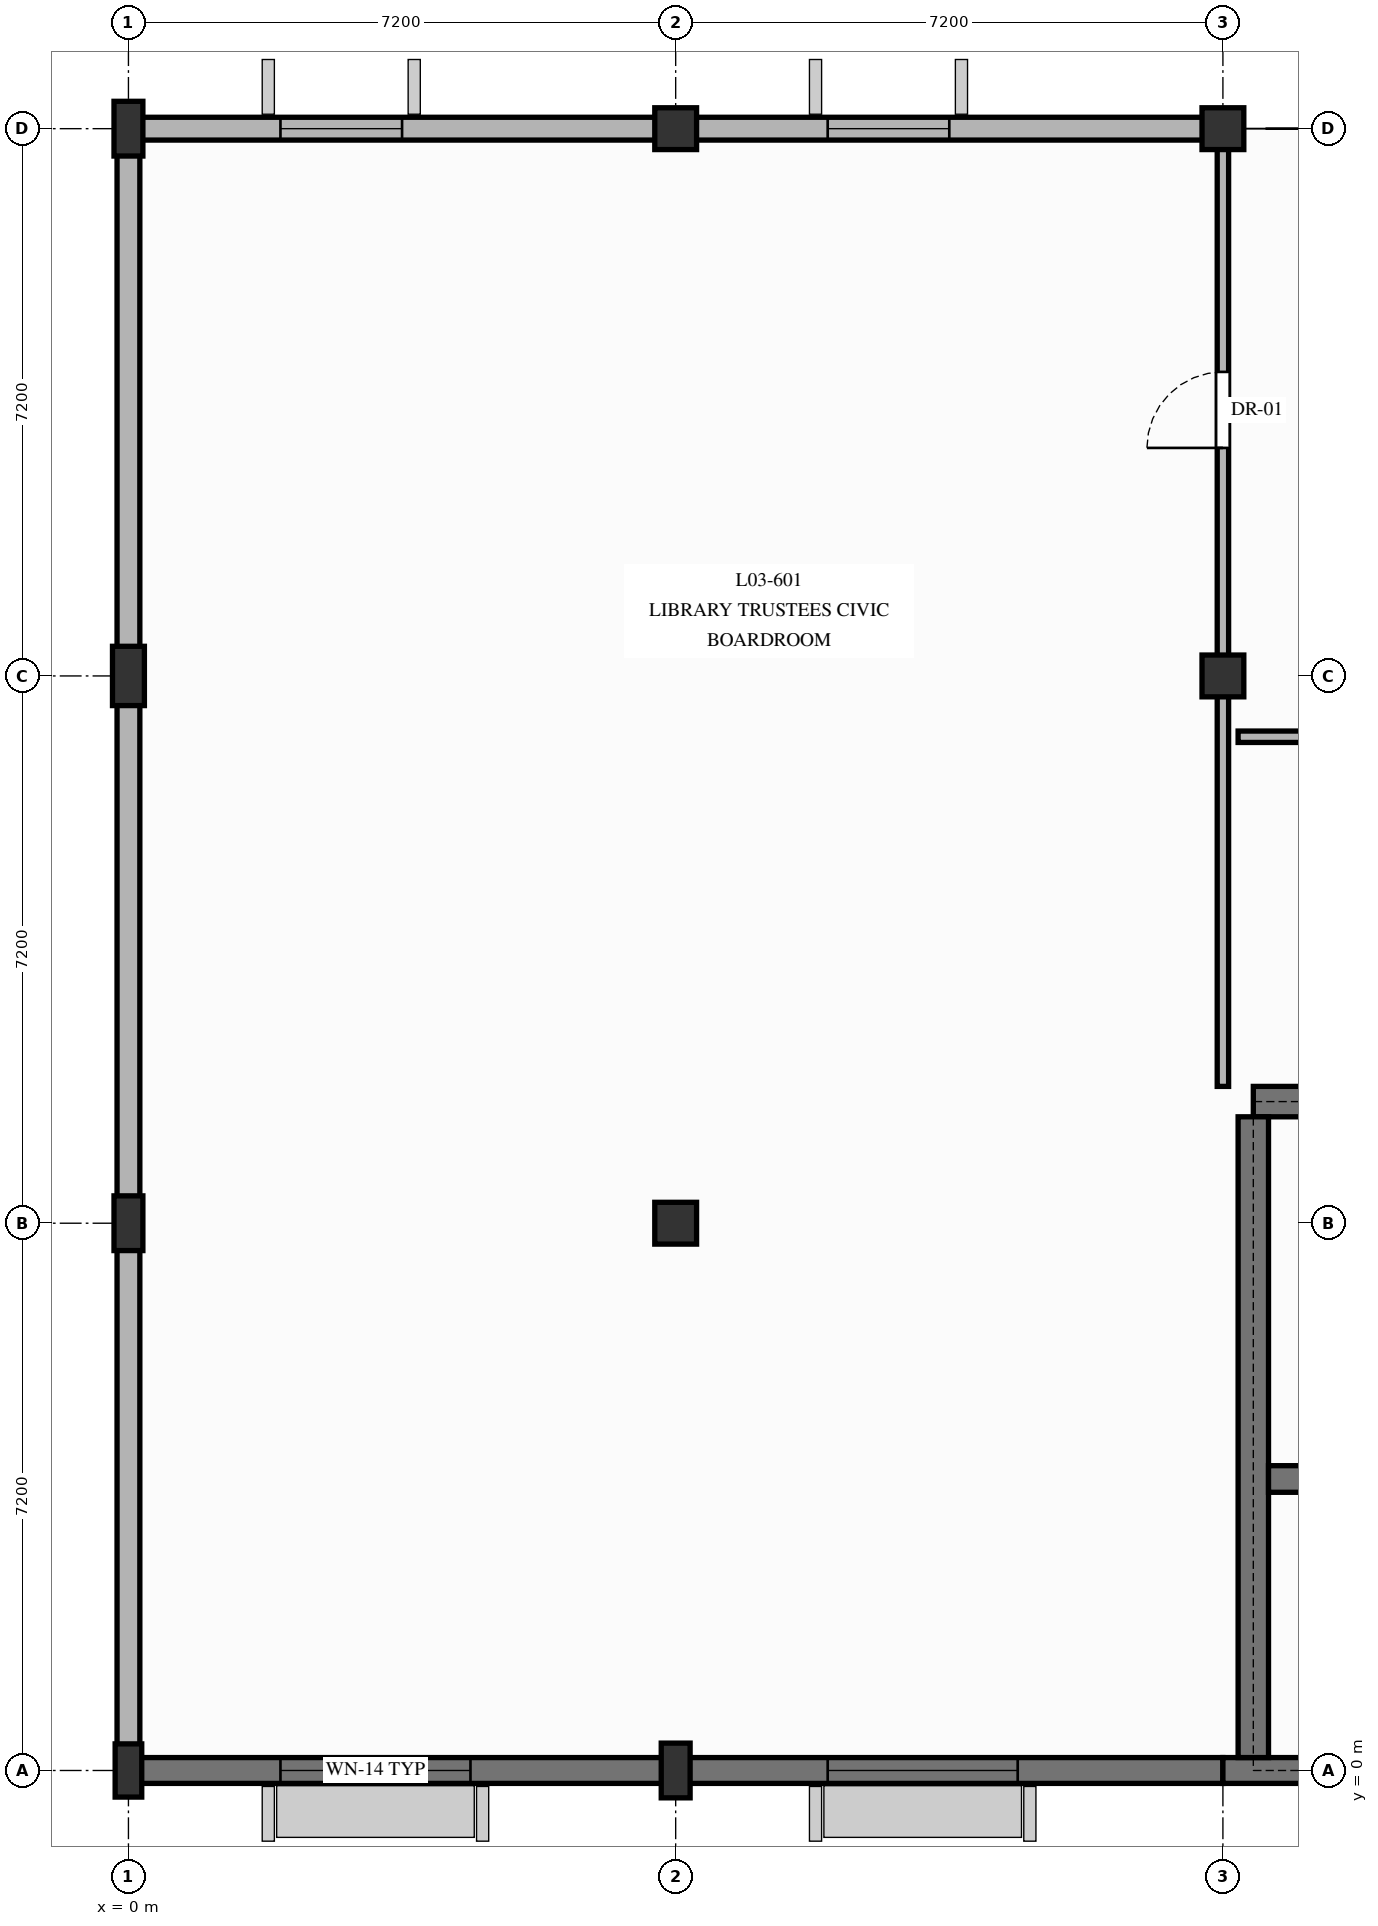
"""IFC4 building model, lengths in metres.
Left out: names, types, materials, properties, quantities, classifications, styles, units other than length and angle.
Written with IfcOpenShell. Run it as: python <this file> out.ifc"""

import sys

from ifc_helpers import new_model, si_unit, direction, frame, frame_2d, origin, origin_with_axes, origin_2d, place, context, subcontext, project, spatial, rectangle, extrude, element, fill, save


model = new_model("IFC4")
c1 = context("Model", 3, precision=1e-05, world=origin(), true_north=direction((0.0, 1.0)))
c2 = subcontext(c1, "Body", "Model", "MODEL_VIEW")
j1 = project(units=[si_unit("LENGTHUNIT", "METRE"), si_unit("PLANEANGLEUNIT", "RADIAN")], contexts=[c1])
p1 = place(None, origin())
s1 = spatial("IfcSite", under=j1, at=p1, CompositionType="ELEMENT")
p2 = place(p1, origin())
s2 = spatial("IfcBuilding", under=s1, at=p2, CompositionType="ELEMENT")
p3 = place(p2, frame((0.0, 0.0, 12.78)))
s3 = spatial("IfcBuildingStorey", under=s2, at=p3, CompositionType="ELEMENT", Elevation=12.78)
p4 = place(p3, frame((0.0, 0.0, 0.0), z_axis=(0.0, 0.0, 1.0), x_axis=(0.0, 1.0, 0.0)))
e1 = element("IfcColumn", 1, at=p4, inside=s3, PredefinedType="PILASTER", context=c2, shape_type="SweptSolid", body=[
    extrude(rectangle(XDim=0.35, YDim=0.7, at=origin_2d()), origin(), (0.0, 0.0, 1.0), 3.74),
])
p5 = place(p3, frame((0.0, 7.2, 0.0), z_axis=(0.0, 0.0, 1.0), x_axis=(1.0, 0.0, 0.0)))
e2 = element("IfcColumn", 2, at=p5, inside=s3, PredefinedType="PILASTER", context=c2, shape_type="SweptSolid", body=[
    extrude(rectangle(XDim=0.38, YDim=0.72, at=origin_2d()), origin(), (0.0, 0.0, 1.0), 3.74),
])
p6 = place(p3, frame((0.0, 14.4, 0.0), z_axis=(0.0, 0.0, 1.0), x_axis=(1.0, 0.0, 0.0)))
e3 = element("IfcColumn", 3, at=p6, inside=s3, PredefinedType="PILASTER", context=c2, shape_type="SweptSolid", body=[
    extrude(rectangle(XDim=0.42, YDim=0.78, at=origin_2d()), origin(), (0.0, 0.0, 1.0), 3.74),
])
for number, where, z_axis, x_axis in (
    (4, (0.0, 21.6, 0.0), (0.0, 0.0, 1.0), (1.0, 0.0, 0.0)),
    (5, (7.2, 0.0, 0.0), (0.0, 0.0, 1.0), (0.0, 1.0, 0.0)),
):
    element("IfcColumn", number, at=place(p3, frame(where, z_axis=z_axis, x_axis=x_axis)), inside=s3, PredefinedType="PILASTER", context=c2, shape_type="SweptSolid", body=[
        extrude(rectangle(XDim=0.38, YDim=0.72, at=origin_2d()), origin(), (0.0, 0.0, 1.0), 3.74),
    ])
for number, where, z_axis, x_axis in (
    (6, (7.2, 7.2, 0.0), (0.0, 0.0, 1.0), (1.0, 0.0, 0.0)),
    (7, (7.2, 21.6, 0.0), (0.0, 0.0, 1.0), (1.0, 0.0, 0.0)),
    (8, (14.4, 14.4, 0.0), (0.0, 0.0, 1.0), (1.0, 0.0, 0.0)),
    (9, (14.4, 21.6, 0.0), (0.0, 0.0, 1.0), (1.0, 0.0, 0.0)),
):
    element("IfcColumn", number, at=place(p3, frame(where, z_axis=z_axis, x_axis=x_axis)), inside=s3, PredefinedType="COLUMN", context=c2, shape_type="SweptSolid", body=[
        extrude(rectangle(XDim=0.55, YDim=0.55, at=origin_2d()), origin(), (0.0, 0.0, 1.0), 3.74),
    ])
p7 = place(p3, origin_with_axes())
e10 = element("IfcWall", 10, at=p7, inside=s3, PredefinedType="SOLIDWALL", context=c2, shape_type="SweptSolid", body=[
    extrude(rectangle(XDim=7.2, YDim=0.34, at=frame_2d((3.6, 0.0))), origin(), (0.0, 0.0, 1.0), 3.42),
])
p8 = place(p7, frame((2.0, 0.0, 0.765)))
e11 = element("IfcOpeningElement", 11, at=p8, cuts=e10, PredefinedType="OPENING", context=c2, shape_type="SweptSolid", body=[
    extrude(rectangle(XDim=2.5, YDim=2.0, at=frame_2d((1.25, 1.0))), frame((0.0, 0.18, 0.0), z_axis=(0.0, -1.0, 0.0), x_axis=(1.0, 0.0, 0.0)), (0.0, 0.0, 1.0), 0.36),
])
p9 = place(p3, frame((7.2, 0.0, 0.0), z_axis=(0.0, 0.0, 1.0), x_axis=(1.0, 0.0, 0.0)))
e12 = element("IfcWall", 12, at=p9, inside=s3, PredefinedType="SOLIDWALL", context=c2, shape_type="SweptSolid", body=[
    extrude(rectangle(XDim=7.2, YDim=0.34, at=frame_2d((3.6, 0.0))), origin(), (0.0, 0.0, 1.0), 3.42),
])
p10 = place(p9, frame((2.0, 0.0, 0.85)))
e13 = element("IfcOpeningElement", 13, at=p10, cuts=e12, PredefinedType="OPENING", context=c2, shape_type="SweptSolid", body=[
    extrude(rectangle(XDim=2.5, YDim=2.0, at=frame_2d((1.25, 1.0))), frame((0.0, 0.18, 0.0), z_axis=(0.0, -1.0, 0.0), x_axis=(1.0, 0.0, 0.0)), (0.0, 0.0, 1.0), 0.36),
])
p11 = place(p3, frame((14.4, 0.0, 0.0), z_axis=(0.0, 0.0, 1.0), x_axis=(1.0, 0.0, 0.0)))
e14 = element("IfcWall", 14, at=p11, inside=s3, PredefinedType="SOLIDWALL", context=c2, shape_type="SweptSolid", body=[
    extrude(rectangle(XDim=7.2, YDim=0.34, at=frame_2d((3.6, 0.0))), origin(), (0.0, 0.0, 1.0), 3.42),
])
p12 = place(p11, frame((5.2, 0.0, 1.05)))
e15 = element("IfcOpeningElement", 15, at=p12, cuts=e14, PredefinedType="OPENING", context=c2, shape_type="SweptSolid", body=[
    extrude(rectangle(XDim=1.05, YDim=1.75, at=frame_2d((0.525, 0.875))), frame((0.0, 0.18, 0.0), z_axis=(0.0, -1.0, 0.0), x_axis=(1.0, 0.0, 0.0)), (0.0, 0.0, 1.0), 0.36),
])
for number, where, z_axis, x_axis in (
    (16, (0.0, 0.0, 0.0), (0.0, 0.0, 1.0), (0.0, 1.0, 0.0)),
    (17, (0.0, 7.2, 0.0), (0.0, 0.0, 1.0), (0.0, 1.0, 0.0)),
):
    element("IfcWall", number, at=place(p3, frame(where, z_axis=z_axis, x_axis=x_axis)), inside=s3, PredefinedType="SOLIDWALL", context=c2, shape_type="SweptSolid", body=[
        extrude(rectangle(XDim=7.2, YDim=0.3, at=frame_2d((3.6, 0.0))), origin(), (0.0, 0.0, 1.0), 2.805),
    ])
p13 = place(p3, frame((0.0, 14.4, 0.0), z_axis=(0.0, 0.0, 1.0), x_axis=(0.0, 1.0, 0.0)))
e18 = element("IfcWall", 18, at=p13, inside=s3, PredefinedType="SOLIDWALL", context=c2, shape_type="SweptSolid", body=[
    extrude(rectangle(XDim=7.2, YDim=0.3, at=frame_2d((3.6, 0.0))), origin(), (0.0, 0.0, 1.0), 2.805),
])
p14 = place(p3, frame((0.0, 21.6, 0.0), z_axis=(0.0, 0.0, 1.0), x_axis=(1.0, 0.0, 0.0)))
e19 = element("IfcWall", 19, at=p14, inside=s3, PredefinedType="SOLIDWALL", context=c2, shape_type="SweptSolid", body=[
    extrude(rectangle(XDim=7.2, YDim=0.3, at=frame_2d((3.6, 0.0))), origin(), (0.0, 0.0, 1.0), 2.805),
])
p15 = place(p14, frame((2.0, 0.0, 0.635)))
e20 = element("IfcOpeningElement", 20, at=p15, cuts=e19, PredefinedType="OPENING", context=c2, shape_type="SweptSolid", body=[
    extrude(rectangle(XDim=1.6, YDim=2.05, at=frame_2d((0.8, 1.025))), frame((0.0, 0.16, 0.0), z_axis=(0.0, -1.0, 0.0), x_axis=(1.0, 0.0, 0.0)), (0.0, 0.0, 1.0), 0.32),
])
p16 = place(p3, frame((7.2, 21.6, 0.0), z_axis=(0.0, 0.0, 1.0), x_axis=(1.0, 0.0, 0.0)))
e21 = element("IfcWall", 21, at=p16, inside=s3, PredefinedType="SOLIDWALL", context=c2, shape_type="SweptSolid", body=[
    extrude(rectangle(XDim=7.2, YDim=0.3, at=frame_2d((3.6, 0.0))), origin(), (0.0, 0.0, 1.0), 2.805),
])
p17 = place(p16, frame((2.0, 0.0, 0.635)))
e22 = element("IfcOpeningElement", 22, at=p17, cuts=e21, PredefinedType="OPENING", context=c2, shape_type="SweptSolid", body=[
    extrude(rectangle(XDim=1.6, YDim=2.05, at=frame_2d((0.8, 1.025))), frame((0.0, 0.16, 0.0), z_axis=(0.0, -1.0, 0.0), x_axis=(1.0, 0.0, 0.0)), (0.0, 0.0, 1.0), 0.32),
])
p18 = place(p3, frame((14.8, 8.8, 0.0), z_axis=(0.0, 0.0, 1.0), x_axis=(1.0, 0.0, 0.0)))
e23 = element("IfcWall", 23, at=p18, inside=s3, PredefinedType="SHEAR", context=c2, shape_type="SweptSolid", body=[
    extrude(rectangle(XDim=10.4, YDim=0.4, at=frame_2d((5.2, 0.0))), origin(), (0.0, 0.0, 1.0), 3.42),
])
p19 = place(p18, frame((2.4, 0.0, 0.0)))
e24 = element("IfcOpeningElement", 24, at=p19, cuts=e23, PredefinedType="OPENING", context=c2, shape_type="SweptSolid", body=[
    extrude(rectangle(XDim=1.5, YDim=2.2, at=frame_2d((0.75, 1.1))), frame((0.0, 0.21, 0.0), z_axis=(0.0, -1.0, 0.0), x_axis=(1.0, 0.0, 0.0)), (0.0, 0.0, 1.0), 0.42),
])
p20 = place(p3, frame((14.8, 0.17, 0.0), z_axis=(0.0, 0.0, 1.0), x_axis=(0.0, 1.0, 0.0)))
e25 = element("IfcWall", 25, at=p20, inside=s3, PredefinedType="SHEAR", context=c2, shape_type="SweptSolid", body=[
    extrude(rectangle(XDim=8.43, YDim=0.4, at=frame_2d((4.215, 0.0))), origin(), (0.0, 0.0, 1.0), 3.42),
])
p21 = place(p3, frame((15.0, 3.835, 0.0), z_axis=(0.0, 0.0, 1.0), x_axis=(1.0, 0.0, 0.0)))
e26 = element("IfcWall", 26, at=p21, inside=s3, PredefinedType="SHEAR", context=c2, shape_type="SweptSolid", body=[
    extrude(rectangle(XDim=10.0, YDim=0.35, at=frame_2d((5.0, 0.0))), origin(), (0.0, 0.0, 1.0), 3.42),
])
p22 = place(p21, frame((0.45, 0.0, 0.0)))
e27 = element("IfcOpeningElement", 27, at=p22, cuts=e26, PredefinedType="OPENING", context=c2, shape_type="SweptSolid", body=[
    extrude(rectangle(XDim=1.05, YDim=2.2, at=frame_2d((0.525, 1.1))), frame((0.0, 0.185, 0.0), z_axis=(0.0, -1.0, 0.0), x_axis=(1.0, 0.0, 0.0)), (0.0, 0.0, 1.0), 0.37),
])
p23 = place(p3, frame((14.4, 9.0, 0.0), z_axis=(0.0, 0.0, 1.0), x_axis=(0.0, 1.0, 0.0)))
e28 = element("IfcWall", 28, at=p23, inside=s3, PredefinedType="PARTITIONING", context=c2, shape_type="SweptSolid", body=[
    extrude(rectangle(XDim=12.6, YDim=0.15, at=frame_2d((6.3, 0.0))), origin(), (0.0, 0.0, 1.0), 2.685),
])
p24 = place(p23, frame((8.4, 0.0, 0.0)))
e29 = element("IfcOpeningElement", 29, at=p24, cuts=e28, PredefinedType="OPENING", context=c2, shape_type="SweptSolid", body=[
    extrude(rectangle(XDim=1.0, YDim=2.15, at=frame_2d((0.5, 1.075))), frame((0.0, 0.085, 0.0), z_axis=(0.0, -1.0, 0.0), x_axis=(1.0, 0.0, 0.0)), (0.0, 0.0, 1.0), 0.17),
])
p25 = place(p3, frame((14.6, 13.6, 0.0), z_axis=(0.0, 0.0, 1.0), x_axis=(1.0, 0.0, 0.0)))
e30 = element("IfcWall", 30, at=p25, inside=s3, PredefinedType="PARTITIONING", context=c2, shape_type="SweptSolid", body=[
    extrude(rectangle(XDim=14.2, YDim=0.15, at=frame_2d((7.1, 0.0))), origin(), (0.0, 0.0, 1.0), 3.42),
])
p26 = place(p25, frame((3.0, 0.0, 0.0)))
e31 = element("IfcOpeningElement", 31, at=p26, cuts=e30, PredefinedType="OPENING", context=c2, shape_type="SweptSolid", body=[
    extrude(rectangle(XDim=1.0, YDim=2.15, at=frame_2d((0.5, 1.075))), frame((0.0, 0.085, 0.0), z_axis=(0.0, -1.0, 0.0), x_axis=(1.0, 0.0, 0.0)), (0.0, 0.0, 1.0), 0.17),
])
p27 = place(p8, origin())
e32 = element("IfcWindow", 32, at=p27, inside=s3, PartitioningType="SINGLE_PANEL", PredefinedType="WINDOW", context=c2, shape_type="SweptSolid", body=[
    extrude(rectangle(XDim=2.5, YDim=2.0, at=frame_2d((1.25, 1.0))), frame((0.0, 0.03, 0.0), z_axis=(0.0, -1.0, 0.0), x_axis=(1.0, 0.0, 0.0)), (0.0, 0.0, 1.0), 0.06),
])
fill(e11, e32)
p28 = place(p10, origin())
e33 = element("IfcWindow", 33, at=p28, inside=s3, PartitioningType="SINGLE_PANEL", PredefinedType="WINDOW", context=c2, shape_type="SweptSolid", body=[
    extrude(rectangle(XDim=2.5, YDim=2.0, at=frame_2d((1.25, 1.0))), frame((0.0, 0.03, 0.0), z_axis=(0.0, -1.0, 0.0), x_axis=(1.0, 0.0, 0.0)), (0.0, 0.0, 1.0), 0.06),
])
fill(e13, e33)
p29 = place(p15, origin())
e34 = element("IfcWindow", 34, at=p29, inside=s3, PartitioningType="SINGLE_PANEL", PredefinedType="WINDOW", context=c2, shape_type="SweptSolid", body=[
    extrude(rectangle(XDim=1.6, YDim=2.05, at=frame_2d((0.8, 1.025))), frame((0.0, 0.03, 0.0), z_axis=(0.0, -1.0, 0.0), x_axis=(1.0, 0.0, 0.0)), (0.0, 0.0, 1.0), 0.06),
])
fill(e20, e34)
p30 = place(p17, origin())
e35 = element("IfcWindow", 35, at=p30, inside=s3, PartitioningType="SINGLE_PANEL", PredefinedType="WINDOW", context=c2, shape_type="SweptSolid", body=[
    extrude(rectangle(XDim=1.6, YDim=2.05, at=frame_2d((0.8, 1.025))), frame((0.0, 0.03, 0.0), z_axis=(0.0, -1.0, 0.0), x_axis=(1.0, 0.0, 0.0)), (0.0, 0.0, 1.0), 0.06),
])
fill(e22, e35)
p31 = place(p24, origin())
e36 = element("IfcDoor", 36, at=p31, inside=s3, OperationType="SINGLE_SWING_LEFT", PredefinedType="DOOR", context=c2, shape_type="SweptSolid", body=[
    extrude(rectangle(XDim=1.0, YDim=2.15, at=frame_2d((0.5, 1.075))), frame((0.0, 0.025, 0.0), z_axis=(0.0, -1.0, 0.0), x_axis=(1.0, 0.0, 0.0)), (0.0, 0.0, 1.0), 0.05),
])
fill(e29, e36)
save(model, sys.argv[1])
